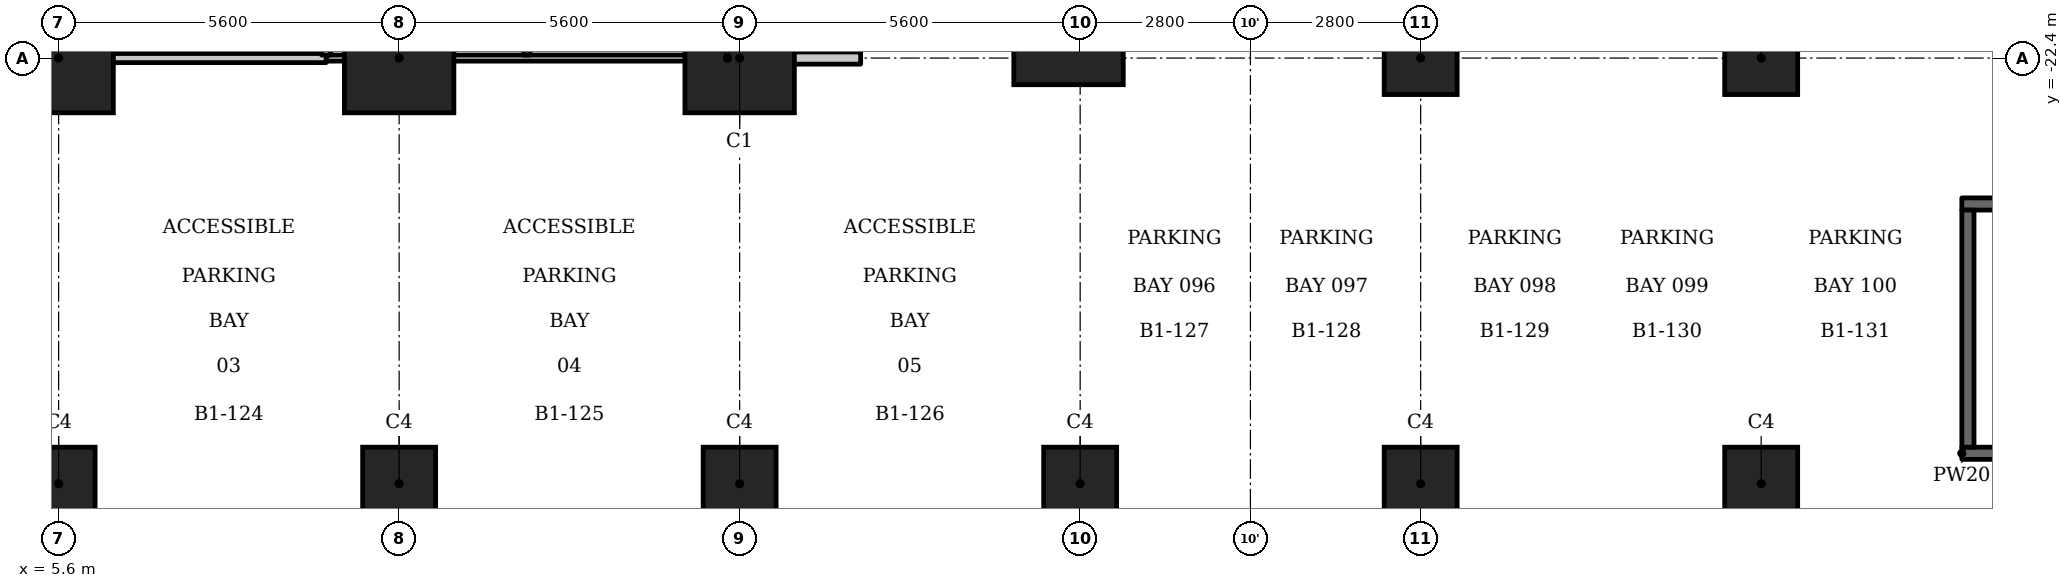
"""IFC4 building model, lengths in metres.
Left out: names, types, materials, properties, quantities, classifications, styles, units other than length and angle.
Written with IfcOpenShell. Run it as: python <this file> out.ifc"""

import sys

from ifc_helpers import new_model, si_unit, direction, frame, frame_2d, origin, origin_2d, place, context, subcontext, project, spatial, rectangle, circle, extrude, element, save


model = new_model("IFC4")
c1 = context("Model", 3, precision=1e-05, world=origin(), true_north=direction((0.0, 1.0)))
c2 = subcontext(c1, "Body", "Model", "MODEL_VIEW")
j1 = project(units=[si_unit("LENGTHUNIT", "METRE"), si_unit("PLANEANGLEUNIT", "RADIAN")], contexts=[c1])
p1 = place(None, origin())
s1 = spatial("IfcSite", under=j1, at=p1, CompositionType="ELEMENT")
p2 = place(p1, origin())
s2 = spatial("IfcBuilding", under=s1, at=p2, CompositionType="ELEMENT")
p3 = place(p2, frame((0.0, 0.0, -4.5)))
s3 = spatial("IfcBuildingStorey", under=s2, at=p3, CompositionType="ELEMENT", Elevation=-4.5)
for number, where, z_axis, x_axis in (
    (1, (5.6, -22.4, 0.0), (0.0, 0.0, 1.0), (1.0, 0.0, 0.0)),
    (2, (11.2, -22.4, 0.0), (0.0, 0.0, 1.0), (1.0, 0.0, 0.0)),
    (3, (16.8, -22.4, 0.0), (0.0, 0.0, 1.0), (1.0, 0.0, 0.0)),
    (4, (22.209, -21.938, 0.0), (0.0, 0.0, 1.0), (1.0, 0.0, 0.0)),
):
    element("IfcColumn", number, at=place(p3, frame(where, z_axis=z_axis, x_axis=x_axis)), inside=s3, PredefinedType="COLUMN", context=c2, shape_type="SweptSolid", body=[
        extrude(rectangle(XDim=1.8, YDim=1.8, at=origin_2d()), origin(), (0.0, 0.0, 1.0), 4.5),
    ])
for number, where, z_axis, x_axis in (
    (5, (5.6, -29.4, 0.0), (0.0, 0.0, 1.0), (1.0, 0.0, 0.0)),
    (6, (11.2, -29.4, 0.0), (0.0, 0.0, 1.0), (1.0, 0.0, 0.0)),
    (7, (16.8, -29.4, 0.0), (0.0, 0.0, 1.0), (1.0, 0.0, 0.0)),
    (8, (22.4, -29.4, 0.0), (0.0, 0.0, 1.0), (1.0, 0.0, 0.0)),
    (9, (28.0, -29.4, 0.0), (0.0, 0.0, 1.0), (1.0, 0.0, 0.0)),
    (10, (33.6, -29.4, 0.0), (0.0, 0.0, 1.0), (1.0, 0.0, 0.0)),
    (11, (28.0, -22.4, 0.0), (0.0, 0.0, 1.0), (1.0, 0.0, 0.0)),
    (12, (33.6, -22.4, 0.0), (0.0, 0.0, 1.0), (1.0, 0.0, 0.0)),
):
    element("IfcColumn", number, at=place(p3, frame(where, z_axis=z_axis, x_axis=x_axis)), inside=s3, PredefinedType="COLUMN", context=c2, shape_type="SweptSolid", body=[
        extrude(circle(Radius=0.6, at=origin_2d()), origin(), (0.0, 0.0, 1.0), 4.5),
    ])
p4 = place(p3, frame((36.9, -28.9, 0.0), z_axis=(0.0, 0.0, 1.0), x_axis=(1.0, 0.0, 0.0)))
e13 = element("IfcWall", 13, at=p4, inside=s3, PredefinedType="SHEAR", context=c2, shape_type="SweptSolid", body=[
    extrude(rectangle(XDim=7.81, YDim=0.2, at=frame_2d((3.905, 0.0))), origin(), (0.0, 0.0, 1.0), 4.05),
])
p5 = place(p3, frame((36.9, -24.8, 0.0), z_axis=(0.0, 0.0, 1.0), x_axis=(1.0, 0.0, 0.0)))
e14 = element("IfcWall", 14, at=p5, inside=s3, PredefinedType="SHEAR", context=c2, shape_type="SweptSolid", body=[
    extrude(rectangle(XDim=7.81, YDim=0.2, at=frame_2d((3.905, 0.0))), origin(), (0.0, 0.0, 1.0), 4.05),
])
p6 = place(p5, frame((5.997, 0.0, 0.0)))
e15 = element("IfcOpeningElement", 15, at=p6, cuts=e14, PredefinedType="OPENING", context=c2, shape_type="SweptSolid", body=[
    extrude(rectangle(XDim=1.2, YDim=2.1, at=frame_2d((0.6, 1.05))), frame((0.0, 0.11, 0.0), z_axis=(0.0, -1.0, 0.0), x_axis=(1.0, 0.0, 0.0)), (0.0, 0.0, 1.0), 0.22),
])
p7 = place(p3, frame((10.0, -22.4, 0.0), z_axis=(0.0, 0.0, 1.0), x_axis=(1.0, 0.0, 0.0)))
e16 = element("IfcWall", 16, at=p7, inside=s3, PredefinedType="PARTITIONING", context=c2, shape_type="SweptSolid", body=[
    extrude(rectangle(XDim=6.6, YDim=0.1, at=frame_2d((3.3, 0.0))), origin(), (0.0, 0.0, 1.0), 3.15),
])
p8 = place(p3, frame((-18.79, -22.4, 0.0), z_axis=(0.0, 0.0, 1.0), x_axis=(1.0, 0.0, 0.0)))
e17 = element("IfcWall", 17, at=p8, inside=s3, PredefinedType="PARTITIONING", context=c2, shape_type="SweptSolid", body=[
    extrude(rectangle(XDim=28.79, YDim=0.15, at=frame_2d((14.395, 0.0))), origin(), (0.0, 0.0, 1.0), 3.15),
])
p9 = place(p8, frame((15.69, 0.0, 0.0)))
e18 = element("IfcOpeningElement", 18, at=p9, cuts=e17, PredefinedType="OPENING", context=c2, shape_type="SweptSolid", body=[
    extrude(rectangle(XDim=1.8, YDim=2.1, at=frame_2d((0.9, 1.05))), frame((0.0, 0.085, 0.0), z_axis=(0.0, -1.0, 0.0), x_axis=(1.0, 0.0, 0.0)), (0.0, 0.0, 1.0), 0.17),
])
p10 = place(p3, frame((16.6, -22.4, 0.0), z_axis=(0.0, 0.0, 1.0), x_axis=(1.0, 0.0, 0.0)))
e19 = element("IfcWall", 19, at=p10, inside=s3, PredefinedType="PARTITIONING", context=c2, shape_type="SweptSolid", body=[
    extrude(rectangle(XDim=2.19, YDim=0.2, at=frame_2d((1.095, 0.0))), origin(), (0.0, 0.0, 1.0), 3.15),
])
p11 = place(p3, frame((10.0, -22.35, 0.0), z_axis=(0.0, 0.0, 1.0), x_axis=(0.0, 1.0, 0.0)))
e20 = element("IfcWall", 20, at=p11, inside=s3, PredefinedType="PARTITIONING", context=c2, shape_type="SweptSolid", body=[
    extrude(rectangle(XDim=6.675, YDim=0.15, at=frame_2d((3.337, 0.0))), origin(), (0.0, 0.0, 1.0), 4.05),
])
p12 = place(p3, frame((13.3, -22.35, 0.0), z_axis=(0.0, 0.0, 1.0), x_axis=(0.0, 1.0, 0.0)))
e21 = element("IfcWall", 21, at=p12, inside=s3, PredefinedType="PARTITIONING", context=c2, shape_type="SweptSolid", body=[
    extrude(rectangle(XDim=6.675, YDim=0.1, at=frame_2d((3.337, 0.0))), origin(), (0.0, 0.0, 1.0), 4.05),
])
p13 = place(p3, frame((16.6, -22.35, 0.0), z_axis=(0.0, 0.0, 1.0), x_axis=(0.0, 1.0, 0.0)))
e22 = element("IfcWall", 22, at=p13, inside=s3, PredefinedType="PARTITIONING", context=c2, shape_type="SweptSolid", body=[
    extrude(rectangle(XDim=6.675, YDim=0.2, at=frame_2d((3.337, 0.0))), origin(), (0.0, 0.0, 1.0), 4.05),
])
p14 = place(p3, frame((37.0, -28.8, 0.0), z_axis=(0.0, 0.0, 1.0), x_axis=(0.0, 1.0, 0.0)))
e23 = element("IfcWall", 23, at=p14, inside=s3, PredefinedType="SHEAR", context=c2, shape_type="SweptSolid", body=[
    extrude(rectangle(XDim=3.9, YDim=0.2, at=frame_2d((1.95, 0.0))), origin(), (0.0, 0.0, 1.0), 4.05),
])
save(model, sys.argv[1])
